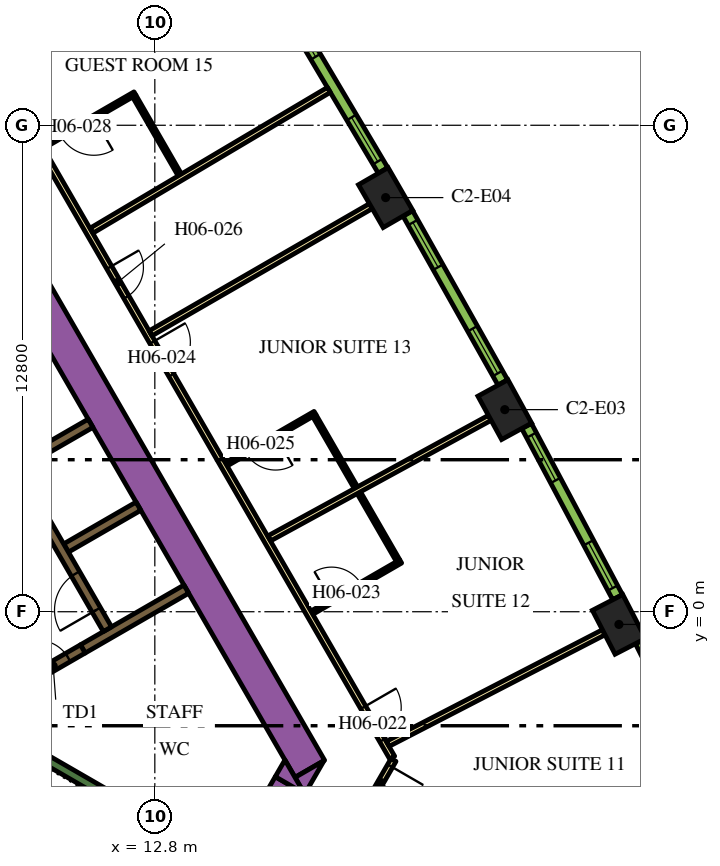
"""IFC4 building model, lengths in metres.
Left out: names, types, materials, properties, quantities, classifications, styles, units other than length and angle.
Written with IfcOpenShell. Run it as: python <this file> out.ifc"""

import sys

from ifc_helpers import new_model, si_unit, direction, frame, frame_2d, origin, origin_2d, place, context, subcontext, project, spatial, polyline, rectangle, outline, extrude, element, fill, save


model = new_model("IFC4")
c1 = context("Model", 3, precision=1e-05, world=origin(), true_north=direction((0.0, 1.0)))
c2 = subcontext(c1, "Body", "Model", "MODEL_VIEW")
j1 = project(units=[si_unit("LENGTHUNIT", "METRE"), si_unit("PLANEANGLEUNIT", "RADIAN")], contexts=[c1])
p1 = place(None, origin())
s1 = spatial("IfcSite", under=j1, at=p1, CompositionType="ELEMENT")
p2 = place(p1, origin())
s2 = spatial("IfcBuilding", under=s1, at=p2, CompositionType="ELEMENT")
p3 = place(p2, frame((0.0, 0.0, 83.7)))
s3 = spatial("IfcBuildingStorey", under=s2, at=p3, CompositionType="ELEMENT", Elevation=83.7)
for number, where, z_axis, x_axis in (
    (1, (25.012, -0.334, 0.0), (0.0, 0.0, 1.0), (-0.459, 0.888, 0.0)),
    (2, (22.009, 5.317, 0.0), (0.0, 0.0, 1.0), (-0.48, 0.877, 0.0)),
    (3, (18.874, 10.897, 0.0), (0.0, 0.0, 1.0), (-0.5, 0.866, 0.0)),
):
    element("IfcColumn", number, at=place(p3, frame(where, z_axis=z_axis, x_axis=x_axis)), inside=s3, PredefinedType="COLUMN", context=c2, shape_type="SweptSolid", body=[
        extrude(rectangle(XDim=1.3, YDim=0.9, at=origin_2d()), origin(), (0.0, 0.0, 1.0), 3.9),
    ])
p4 = place(p3, frame((6.776, 13.364, 0.0), z_axis=(0.0, 0.0, 1.0), x_axis=(0.500004177138, -0.8660229921, 0.0)))
e4 = element("IfcWall", 4, at=p4, inside=s3, PredefinedType="SOLIDWALL", context=c2, shape_type="SweptSolid", body=[
    extrude(rectangle(XDim=20.204, YDim=0.9, at=frame_2d((10.102, 0.0))), origin(), (0.0, 0.0, 1.0), 3.9),
])
p5 = place(p3, origin())
e5 = element("IfcWall", 5, at=p5, inside=s3, PredefinedType="SOLIDWALL", context=c2, shape_type="SweptSolid", body=[
    extrude(outline(polyline([(16.743, -4.8), (16.489, -4.36), (17.251, -3.92), (16.743, -4.8)])), origin(), (0.0, 0.0, 1.0), 3.9),
])
p6 = place(p3, frame((11.695, -12.644, 0.0), z_axis=(0.0, 0.0, 1.0), x_axis=(0.500010229568, 0.86601949766, 0.0)))
e6 = element("IfcWall", 6, at=p6, inside=s3, PredefinedType="SOLIDWALL", context=c2, shape_type="SweptSolid", body=[
    extrude(rectangle(XDim=9.326, YDim=0.9, at=frame_2d((4.663, 0.0))), origin(), (0.0, 0.0, 1.0), 3.9),
])
e7 = element("IfcWall", 7, at=p5, inside=s3, PredefinedType="SOLIDWALL", context=c2, shape_type="SweptSolid", body=[
    extrude(outline(polyline([(16.223, -3.9), (16.732, -4.78), (15.969, -4.34), (16.223, -3.9)])), origin(), (0.0, 0.0, 1.0), 3.9),
])
p7 = place(p3, frame((8.334, -2.964, 0.0), z_axis=(0.0, 0.0, 1.0), x_axis=(0.866016039709, -0.500016218704, 0.0)))
e8 = element("IfcWall", 8, at=p7, inside=s3, PredefinedType="SOLIDWALL", context=c2, shape_type="SweptSolid", body=[
    extrude(rectangle(XDim=7.05, YDim=0.25, at=frame_2d((3.525, 0.0))), origin(), (0.0, 0.0, 1.0), 3.9),
])
p8 = place(p3, frame((10.464, 1.677, 0.0), z_axis=(0.0, 0.0, 1.0), x_axis=(0.86605622881, 0.499946605688, 0.0)))
e9 = element("IfcWall", 9, at=p8, inside=s3, PredefinedType="SOLIDWALL", context=c2, shape_type="SweptSolid", body=[
    extrude(rectangle(XDim=2.2, YDim=0.25, at=frame_2d((1.1, 0.0))), origin(), (0.0, 0.0, 1.0), 3.9),
])
p9 = place(p3, frame((13.629, 0.594, 0.0), z_axis=(0.0, 0.0, 1.0), x_axis=(-0.86602790099, -0.499995674689, 0.0)))
e10 = element("IfcWall", 10, at=p9, inside=s3, PredefinedType="SOLIDWALL", context=c2, shape_type="SweptSolid", body=[
    extrude(rectangle(XDim=3.146, YDim=0.25, at=frame_2d((1.573, 0.0))), origin(), (0.0, 0.0, 1.0), 3.9),
])
p10 = place(p3, frame((9.204, 3.859, 0.0), z_axis=(0.0, 0.0, 1.0), x_axis=(0.86605622881, 0.499946605688, 0.0)))
e11 = element("IfcWall", 11, at=p10, inside=s3, PredefinedType="SOLIDWALL", context=c2, shape_type="SweptSolid", body=[
    extrude(rectangle(XDim=2.2, YDim=0.25, at=frame_2d((1.1, 0.0))), origin(), (0.0, 0.0, 1.0), 3.9),
])
p11 = place(p3, frame((11.553, -0.46, 0.0), z_axis=(0.0, 0.0, 1.0), x_axis=(-0.500006514828, 0.866021642414, 0.0)))
e12 = element("IfcWall", 12, at=p11, inside=s3, PredefinedType="SOLIDWALL", context=c2, shape_type="SweptSolid", body=[
    extrude(rectangle(XDim=12.35, YDim=0.25, at=frame_2d((6.175, 0.0))), origin(), (0.0, 0.0, 1.0), 3.9),
])
p12 = place(p11, frame((0.585, 0.0, 0.0)))
e13 = element("IfcOpeningElement", 13, at=p12, cuts=e12, PredefinedType="OPENING", context=c2, shape_type="SweptSolid", body=[
    extrude(rectangle(XDim=1.1, YDim=2.1, at=frame_2d((0.55, 1.05))), frame((0.0, 0.135, 0.0), z_axis=(0.0, -1.0, 0.0), x_axis=(1.0, 0.0, 0.0)), (0.0, 0.0, 1.0), 0.27),
])
p13 = place(p11, frame((3.105, 0.0, 0.0)))
e14 = element("IfcOpeningElement", 14, at=p13, cuts=e12, PredefinedType="OPENING", context=c2, shape_type="SweptSolid", body=[
    extrude(rectangle(XDim=1.1, YDim=2.1, at=frame_2d((0.55, 1.05))), frame((0.0, 0.135, 0.0), z_axis=(0.0, -1.0, 0.0), x_axis=(1.0, 0.0, 0.0)), (0.0, 0.0, 1.0), 0.27),
])
p14 = place(p11, frame((5.625, 0.0, 0.0)))
e15 = element("IfcOpeningElement", 15, at=p14, cuts=e12, PredefinedType="OPENING", context=c2, shape_type="SweptSolid", body=[
    extrude(rectangle(XDim=1.1, YDim=2.1, at=frame_2d((0.55, 1.05))), frame((0.0, 0.135, 0.0), z_axis=(0.0, -1.0, 0.0), x_axis=(1.0, 0.0, 0.0)), (0.0, 0.0, 1.0), 0.27),
])
p15 = place(p3, frame((9.346, -1.879, 0.0), z_axis=(0.0, 0.0, 1.0), x_axis=(0.866047807691, 0.499961193289, 0.0)))
e16 = element("IfcWall", 16, at=p15, inside=s3, PredefinedType="SOLIDWALL", context=c2, shape_type="SweptSolid", body=[
    extrude(rectangle(XDim=1.8, YDim=0.25, at=frame_2d((0.9, 0.0))), origin(), (0.0, 0.0, 1.0), 3.9),
])
p16 = place(p15, frame((0.45, 0.0, 0.0)))
e17 = element("IfcOpeningElement", 17, at=p16, cuts=e16, PredefinedType="OPENING", context=c2, shape_type="SweptSolid", body=[
    extrude(rectangle(XDim=0.9, YDim=2.1, at=frame_2d((0.45, 1.05))), frame((0.0, 0.135, 0.0), z_axis=(0.0, -1.0, 0.0), x_axis=(1.0, 0.0, 0.0)), (0.0, 0.0, 1.0), 0.27),
])
p17 = place(p3, frame((19.081, -3.9, 0.0), z_axis=(0.0, 0.0, 1.0), x_axis=(-0.499974327079, -0.866040225545, 0.0)))
e18 = element("IfcWall", 18, at=p17, inside=s3, PredefinedType="PARTITIONING", context=c2, shape_type="SweptSolid", body=[
    extrude(rectangle(XDim=5.258, YDim=0.15, at=frame_2d((2.629, 0.0))), origin(), (0.0, 0.0, 1.0), 2.75),
])
p18 = place(p17, frame((0.18, 0.0, 0.0)))
e19 = element("IfcOpeningElement", 19, at=p18, cuts=e18, PredefinedType="OPENING", context=c2, shape_type="SweptSolid", body=[
    extrude(rectangle(XDim=1.0, YDim=2.1, at=frame_2d((0.5, 1.05))), frame((0.0, 0.085, 0.0), z_axis=(0.0, -1.0, 0.0), x_axis=(1.0, 0.0, 0.0)), (0.0, 0.0, 1.0), 0.17),
])
p19 = place(p3, frame((6.163, 18.475, 0.0), z_axis=(0.0, 0.0, 1.0), x_axis=(0.500001317485, -0.866024643133, 0.0)))
e20 = element("IfcWall", 20, at=p19, inside=s3, PredefinedType="PARTITIONING", context=c2, shape_type="SweptSolid", body=[
    extrude(rectangle(XDim=25.767, YDim=0.15, at=frame_2d((12.883, 0.0))), origin(), (0.0, 0.0, 1.0), 2.75),
])
p20 = place(p19, frame((24.241, 0.0, 0.0)))
e21 = element("IfcOpeningElement", 21, at=p20, cuts=e20, PredefinedType="OPENING", context=c2, shape_type="SweptSolid", body=[
    extrude(rectangle(XDim=1.0, YDim=2.1, at=frame_2d((0.5, 1.05))), frame((0.0, 0.085, 0.0), z_axis=(0.0, -1.0, 0.0), x_axis=(1.0, 0.0, 0.0)), (0.0, 0.0, 1.0), 0.17),
])
p21 = place(p19, frame((13.144, 0.0, 0.0)))
e22 = element("IfcOpeningElement", 22, at=p21, cuts=e20, PredefinedType="OPENING", context=c2, shape_type="SweptSolid", body=[
    extrude(rectangle(XDim=1.0, YDim=2.1, at=frame_2d((0.5, 1.05))), frame((0.0, 0.085, 0.0), z_axis=(0.0, -1.0, 0.0), x_axis=(1.0, 0.0, 0.0)), (0.0, 0.0, 1.0), 0.17),
])
p22 = place(p19, frame((10.874, 0.0, 0.0)))
e23 = element("IfcOpeningElement", 23, at=p22, cuts=e20, PredefinedType="OPENING", context=c2, shape_type="SweptSolid", body=[
    extrude(rectangle(XDim=0.9, YDim=2.1, at=frame_2d((0.45, 1.05))), frame((0.0, 0.085, 0.0), z_axis=(0.0, -1.0, 0.0), x_axis=(1.0, 0.0, 0.0)), (0.0, 0.0, 1.0), 0.17),
])
p23 = place(p19, frame((3.718, 0.0, 0.0)))
e24 = element("IfcOpeningElement", 24, at=p23, cuts=e20, PredefinedType="OPENING", context=c2, shape_type="SweptSolid", body=[
    extrude(rectangle(XDim=1.1, YDim=2.1, at=frame_2d((0.55, 1.05))), frame((0.0, 0.085, 0.0), z_axis=(0.0, -1.0, 0.0), x_axis=(1.0, 0.0, 0.0)), (0.0, 0.0, 1.0), 0.17),
])
p24 = place(p19, frame((2.411, 0.0, 0.0)))
e25 = element("IfcOpeningElement", 25, at=p24, cuts=e20, PredefinedType="OPENING", context=c2, shape_type="SweptSolid", body=[
    extrude(rectangle(XDim=1.0, YDim=2.1, at=frame_2d((0.5, 1.05))), frame((0.0, 0.085, 0.0), z_axis=(0.0, -1.0, 0.0), x_axis=(1.0, 0.0, 0.0)), (0.0, 0.0, 1.0), 0.17),
])
p25 = place(p3, frame((17.379, 13.731, 0.0), z_axis=(0.0, 0.0, 1.0), x_axis=(-0.860132461691, -0.510070728768, 0.0)))
e26 = element("IfcWall", 26, at=p25, inside=s3, PredefinedType="PARTITIONING", context=c2, shape_type="SweptSolid", body=[
    extrude(rectangle(XDim=7.257, YDim=0.15, at=frame_2d((3.628, 0.0))), origin(), (0.0, 0.0, 1.0), 2.75),
])
p26 = place(p3, frame((18.484, 10.672, 0.0), z_axis=(0.0, 0.0, 1.0), x_axis=(-0.866019162053, -0.50001081084, 0.0)))
e27 = element("IfcWall", 27, at=p26, inside=s3, PredefinedType="PARTITIONING", context=c2, shape_type="SweptSolid", body=[
    extrude(rectangle(XDim=6.694, YDim=0.15, at=frame_2d((3.347, 0.0))), origin(), (0.0, 0.0, 1.0), 2.75),
])
p27 = place(p3, frame((21.614, 5.102, 0.0), z_axis=(0.0, 0.0, 1.0), x_axis=(-0.877484555087, -0.479604895287, 0.0)))
e28 = element("IfcWall", 28, at=p27, inside=s3, PredefinedType="PARTITIONING", context=c2, shape_type="SweptSolid", body=[
    extrude(rectangle(XDim=6.611, YDim=0.15, at=frame_2d((3.306, 0.0))), origin(), (0.0, 0.0, 1.0), 2.75),
])
p28 = place(p3, frame((24.613, -0.541, 0.0), z_axis=(0.0, 0.0, 1.0), x_axis=(-0.888459912519, -0.458954228487, 0.0)))
e29 = element("IfcWall", 29, at=p28, inside=s3, PredefinedType="PARTITIONING", context=c2, shape_type="SweptSolid", body=[
    extrude(rectangle(XDim=6.392, YDim=0.15, at=frame_2d((3.196, 0.0))), origin(), (0.0, 0.0, 1.0), 2.75),
])
p29 = place(p3, frame((16.931, -0.026, 0.0), z_axis=(0.0, 0.0, 1.0), x_axis=(0.866059108428, 0.4999416173, 0.0)))
e30 = element("IfcWall", 30, at=p29, inside=s3, PredefinedType="PARTITIONING", context=c2, shape_type="SweptSolid", body=[
    extrude(rectangle(XDim=2.7, YDim=0.1, at=frame_2d((1.35, 0.0))), origin(), (0.0, 0.0, 1.0), 2.75),
])
p30 = place(p29, frame((0.6, 0.0, 0.0)))
e31 = element("IfcOpeningElement", 31, at=p30, cuts=e30, PredefinedType="OPENING", context=c2, shape_type="SweptSolid", body=[
    extrude(rectangle(XDim=0.9, YDim=2.1, at=frame_2d((0.45, 1.05))), frame((0.0, 0.06, 0.0), z_axis=(0.0, -1.0, 0.0), x_axis=(1.0, 0.0, 0.0)), (0.0, 0.0, 1.0), 0.12),
])
p31 = place(p3, frame((19.196, 1.351, 0.0), z_axis=(0.0, 0.0, 1.0), x_axis=(-0.499956128963, 0.866050731258, 0.0)))
e32 = element("IfcWall", 32, at=p31, inside=s3, PredefinedType="PARTITIONING", context=c2, shape_type="SweptSolid", body=[
    extrude(rectangle(XDim=2.05, YDim=0.1, at=frame_2d((1.025, 0.0))), origin(), (0.0, 0.0, 1.0), 2.75),
])
p32 = place(p3, frame((17.016, 5.228, 0.0), z_axis=(0.0, 0.0, 1.0), x_axis=(-0.86599734893, -0.500048589285, 0.0)))
e33 = element("IfcWall", 33, at=p32, inside=s3, PredefinedType="PARTITIONING", context=c2, shape_type="SweptSolid", body=[
    extrude(rectangle(XDim=2.7, YDim=0.1, at=frame_2d((1.35, 0.0))), origin(), (0.0, 0.0, 1.0), 2.75),
])
p33 = place(p32, frame((1.2, 0.0, 0.0)))
e34 = element("IfcOpeningElement", 34, at=p33, cuts=e33, PredefinedType="OPENING", context=c2, shape_type="SweptSolid", body=[
    extrude(rectangle(XDim=0.9, YDim=2.1, at=frame_2d((0.45, 1.05))), frame((0.0, 0.06, 0.0), z_axis=(0.0, -1.0, 0.0), x_axis=(1.0, 0.0, 0.0)), (0.0, 0.0, 1.0), 0.12),
])
p34 = place(p3, frame((16.997, 5.16, 0.0), z_axis=(0.0, 0.0, 1.0), x_axis=(0.500011965869, -0.866018495177, 0.0)))
e35 = element("IfcWall", 35, at=p34, inside=s3, PredefinedType="PARTITIONING", context=c2, shape_type="SweptSolid", body=[
    extrude(rectangle(XDim=2.19, YDim=0.1, at=frame_2d((1.095, 0.0))), origin(), (0.0, 0.0, 1.0), 2.75),
])
p35 = place(p3, frame((12.277, 13.635, 0.0), z_axis=(0.0, 0.0, 1.0), x_axis=(-0.866034573852, -0.49998411664, 0.0)))
e36 = element("IfcWall", 36, at=p35, inside=s3, PredefinedType="PARTITIONING", context=c2, shape_type="SweptSolid", body=[
    extrude(rectangle(XDim=2.8, YDim=0.1, at=frame_2d((1.4, 0.0))), origin(), (0.0, 0.0, 1.0), 2.75),
])
p36 = place(p35, frame((1.25, 0.0, 0.0)))
e37 = element("IfcOpeningElement", 37, at=p36, cuts=e36, PredefinedType="OPENING", context=c2, shape_type="SweptSolid", body=[
    extrude(rectangle(XDim=1.0, YDim=2.1, at=frame_2d((0.5, 1.05))), frame((0.0, 0.06, 0.0), z_axis=(0.0, -1.0, 0.0), x_axis=(1.0, 0.0, 0.0)), (0.0, 0.0, 1.0), 0.12),
])
p37 = place(p3, frame((12.259, 13.567, 0.0), z_axis=(0.0, 0.0, 1.0), x_axis=(0.500017192868, -0.86601547725, 0.0)))
e38 = element("IfcWall", 38, at=p37, inside=s3, PredefinedType="PARTITIONING", context=c2, shape_type="SweptSolid", body=[
    extrude(rectangle(XDim=2.39, YDim=0.1, at=frame_2d((1.195, 0.0))), origin(), (0.0, 0.0, 1.0), 2.75),
])
p38 = place(p3, frame((27.864, -5.336, 0.0), z_axis=(0.0, 0.0, 1.0), x_axis=(-0.448534297211, 0.893765620409, 0.0)))
e39 = element("IfcWall", 39, at=p38, inside=s3, PredefinedType="SOLIDWALL", context=c2, shape_type="SweptSolid", body=[
    extrude(rectangle(XDim=5.1, YDim=0.29, at=frame_2d((2.55, 0.0))), origin(), (0.0, 0.0, 1.0), 3.65),
])
p39 = place(p38, frame((0.272, 0.0, 0.9)))
e40 = element("IfcOpeningElement", 40, at=p39, cuts=e39, PredefinedType="OPENING", context=c2, shape_type="SweptSolid", body=[
    extrude(rectangle(XDim=1.35, YDim=2.15, at=frame_2d((0.675, 1.075))), frame((0.0, 0.155, 0.0), z_axis=(0.0, -1.0, 0.0), x_axis=(1.0, 0.0, 0.0)), (0.0, 0.0, 1.0), 0.31),
])
p40 = place(p38, frame((3.478, 0.0, 0.9)))
e41 = element("IfcOpeningElement", 41, at=p40, cuts=e39, PredefinedType="OPENING", context=c2, shape_type="SweptSolid", body=[
    extrude(rectangle(XDim=1.35, YDim=2.15, at=frame_2d((0.675, 1.075))), frame((0.0, 0.155, 0.0), z_axis=(0.0, -1.0, 0.0), x_axis=(1.0, 0.0, 0.0)), (0.0, 0.0, 1.0), 0.31),
])
p41 = place(p3, frame((24.977, 0.383, 0.0), z_axis=(0.0, 0.0, 1.0), x_axis=(-0.469323203119, 0.883026461106, 0.0)))
e42 = element("IfcWall", 42, at=p41, inside=s3, PredefinedType="SOLIDWALL", context=c2, shape_type="SweptSolid", body=[
    extrude(rectangle(XDim=5.101, YDim=0.29, at=frame_2d((2.55, 0.0))), origin(), (0.0, 0.0, 1.0), 3.65),
])
p42 = place(p41, frame((0.273, 0.0, 0.9)))
e43 = element("IfcOpeningElement", 43, at=p42, cuts=e42, PredefinedType="OPENING", context=c2, shape_type="SweptSolid", body=[
    extrude(rectangle(XDim=1.35, YDim=2.15, at=frame_2d((0.675, 1.075))), frame((0.0, 0.155, 0.0), z_axis=(0.0, -1.0, 0.0), x_axis=(1.0, 0.0, 0.0)), (0.0, 0.0, 1.0), 0.31),
])
p43 = place(p41, frame((3.478, 0.0, 0.9)))
e44 = element("IfcOpeningElement", 44, at=p43, cuts=e42, PredefinedType="OPENING", context=c2, shape_type="SweptSolid", body=[
    extrude(rectangle(XDim=1.35, YDim=2.15, at=frame_2d((0.675, 1.075))), frame((0.0, 0.155, 0.0), z_axis=(0.0, -1.0, 0.0), x_axis=(1.0, 0.0, 0.0)), (0.0, 0.0, 1.0), 0.31),
])
p44 = place(p3, frame((21.956, 6.033, 0.0), z_axis=(0.0, 0.0, 1.0), x_axis=(-0.48983164787, 0.87181704316, 0.0)))
e45 = element("IfcWall", 45, at=p44, inside=s3, PredefinedType="SOLIDWALL", context=c2, shape_type="SweptSolid", body=[
    extrude(rectangle(XDim=5.1, YDim=0.29, at=frame_2d((2.55, 0.0))), origin(), (0.0, 0.0, 1.0), 3.65),
])
p45 = place(p44, frame((0.273, 0.0, 0.9)))
e46 = element("IfcOpeningElement", 46, at=p45, cuts=e45, PredefinedType="OPENING", context=c2, shape_type="SweptSolid", body=[
    extrude(rectangle(XDim=1.35, YDim=2.15, at=frame_2d((0.675, 1.075))), frame((0.0, 0.155, 0.0), z_axis=(0.0, -1.0, 0.0), x_axis=(1.0, 0.0, 0.0)), (0.0, 0.0, 1.0), 0.31),
])
p46 = place(p44, frame((3.478, 0.0, 0.9)))
e47 = element("IfcOpeningElement", 47, at=p46, cuts=e45, PredefinedType="OPENING", context=c2, shape_type="SweptSolid", body=[
    extrude(rectangle(XDim=1.35, YDim=2.15, at=frame_2d((0.675, 1.075))), frame((0.0, 0.155, 0.0), z_axis=(0.0, -1.0, 0.0), x_axis=(1.0, 0.0, 0.0)), (0.0, 0.0, 1.0), 0.31),
])
p47 = place(p3, frame((18.805, 11.611, 0.0), z_axis=(0.0, 0.0, 1.0), x_axis=(-0.510054281659, 0.860142214847, 0.0)))
e48 = element("IfcWall", 48, at=p47, inside=s3, PredefinedType="SOLIDWALL", context=c2, shape_type="SweptSolid", body=[
    extrude(rectangle(XDim=5.101, YDim=0.29, at=frame_2d((2.55, 0.0))), origin(), (0.0, 0.0, 1.0), 3.65),
])
p48 = place(p47, frame((0.273, 0.0, 0.9)))
e49 = element("IfcOpeningElement", 49, at=p48, cuts=e48, PredefinedType="OPENING", context=c2, shape_type="SweptSolid", body=[
    extrude(rectangle(XDim=1.35, YDim=2.15, at=frame_2d((0.675, 1.075))), frame((0.0, 0.155, 0.0), z_axis=(0.0, -1.0, 0.0), x_axis=(1.0, 0.0, 0.0)), (0.0, 0.0, 1.0), 0.31),
])
p49 = place(p47, frame((3.478, 0.0, 0.9)))
e50 = element("IfcOpeningElement", 50, at=p49, cuts=e48, PredefinedType="OPENING", context=c2, shape_type="SweptSolid", body=[
    extrude(rectangle(XDim=1.35, YDim=2.15, at=frame_2d((0.675, 1.075))), frame((0.0, 0.155, 0.0), z_axis=(0.0, -1.0, 0.0), x_axis=(1.0, 0.0, 0.0)), (0.0, 0.0, 1.0), 0.31),
])
p50 = place(p12, origin())
e51 = element("IfcDoor", 51, at=p50, inside=s3, OperationType="DOUBLE_DOOR_SLIDING", PredefinedType="DOOR", context=c2, shape_type="SweptSolid", body=[
    extrude(rectangle(XDim=1.1, YDim=2.1, at=frame_2d((0.55, 1.05))), frame((0.0, 0.025, 0.0), z_axis=(0.0, -1.0, 0.0), x_axis=(1.0, 0.0, 0.0)), (0.0, 0.0, 1.0), 0.05),
])
fill(e13, e51)
p51 = place(p16, origin())
e52 = element("IfcDoor", 52, at=p51, inside=s3, OperationType="SINGLE_SWING_LEFT", PredefinedType="DOOR", context=c2, shape_type="SweptSolid", body=[
    extrude(rectangle(XDim=0.9, YDim=2.1, at=frame_2d((0.45, 1.05))), frame((0.0, 0.025, 0.0), z_axis=(0.0, -1.0, 0.0), x_axis=(1.0, 0.0, 0.0)), (0.0, 0.0, 1.0), 0.05),
])
fill(e17, e52)
p52 = place(p18, origin())
e53 = element("IfcDoor", 53, at=p52, inside=s3, OperationType="SINGLE_SWING_LEFT", PredefinedType="DOOR", context=c2, shape_type="SweptSolid", body=[
    extrude(rectangle(XDim=1.0, YDim=2.1, at=frame_2d((0.5, 1.05))), frame((0.0, 0.025, 0.0), z_axis=(0.0, -1.0, 0.0), x_axis=(1.0, 0.0, 0.0)), (0.0, 0.0, 1.0), 0.05),
])
fill(e19, e53)
p53 = place(p20, origin())
e54 = element("IfcDoor", 54, at=p53, inside=s3, OperationType="SINGLE_SWING_RIGHT", PredefinedType="DOOR", context=c2, shape_type="SweptSolid", body=[
    extrude(rectangle(XDim=1.0, YDim=2.1, at=frame_2d((0.5, 1.05))), frame((0.0, 0.025, 0.0), z_axis=(0.0, -1.0, 0.0), x_axis=(1.0, 0.0, 0.0)), (0.0, 0.0, 1.0), 0.05),
])
fill(e21, e54)
p54 = place(p30, origin())
e55 = element("IfcDoor", 55, at=p54, inside=s3, OperationType="SINGLE_SWING_RIGHT", PredefinedType="DOOR", context=c2, shape_type="SweptSolid", body=[
    extrude(rectangle(XDim=0.9, YDim=2.1, at=frame_2d((0.45, 1.05))), frame((0.0, 0.025, 0.0), z_axis=(0.0, -1.0, 0.0), x_axis=(1.0, 0.0, 0.0)), (0.0, 0.0, 1.0), 0.05),
])
fill(e31, e55)
p55 = place(p21, origin())
e56 = element("IfcDoor", 56, at=p55, inside=s3, OperationType="SINGLE_SWING_LEFT", PredefinedType="DOOR", context=c2, shape_type="SweptSolid", body=[
    extrude(rectangle(XDim=1.0, YDim=2.1, at=frame_2d((0.5, 1.05))), frame((0.0, 0.025, 0.0), z_axis=(0.0, -1.0, 0.0), x_axis=(1.0, 0.0, 0.0)), (0.0, 0.0, 1.0), 0.05),
])
fill(e22, e56)
p56 = place(p33, origin())
e57 = element("IfcDoor", 57, at=p56, inside=s3, OperationType="SINGLE_SWING_LEFT", PredefinedType="DOOR", context=c2, shape_type="SweptSolid", body=[
    extrude(rectangle(XDim=0.9, YDim=2.1, at=frame_2d((0.45, 1.05))), frame((0.0, 0.025, 0.0), z_axis=(0.0, -1.0, 0.0), x_axis=(1.0, 0.0, 0.0)), (0.0, 0.0, 1.0), 0.05),
])
fill(e34, e57)
p57 = place(p22, origin())
e58 = element("IfcDoor", 58, at=p57, inside=s3, OperationType="SINGLE_SWING_RIGHT", PredefinedType="DOOR", context=c2, shape_type="SweptSolid", body=[
    extrude(rectangle(XDim=0.9, YDim=2.1, at=frame_2d((0.45, 1.05))), frame((0.0, 0.025, 0.0), z_axis=(0.0, -1.0, 0.0), x_axis=(1.0, 0.0, 0.0)), (0.0, 0.0, 1.0), 0.05),
])
fill(e23, e58)
p58 = place(p36, origin())
e59 = element("IfcDoor", 59, at=p58, inside=s3, OperationType="SINGLE_SWING_RIGHT", PredefinedType="DOOR", context=c2, shape_type="SweptSolid", body=[
    extrude(rectangle(XDim=1.0, YDim=2.1, at=frame_2d((0.5, 1.05))), frame((0.0, 0.025, 0.0), z_axis=(0.0, -1.0, 0.0), x_axis=(1.0, 0.0, 0.0)), (0.0, 0.0, 1.0), 0.05),
])
fill(e37, e59)
p59 = place(p42, origin())
e60 = element("IfcWindow", 60, at=p59, inside=s3, PartitioningType="DOUBLE_PANEL_VERTICAL", PredefinedType="WINDOW", context=c2, shape_type="SweptSolid", body=[
    extrude(rectangle(XDim=1.35, YDim=2.15, at=frame_2d((0.675, 1.075))), frame((0.0, 0.015, 0.0), z_axis=(0.0, -1.0, 0.0), x_axis=(1.0, 0.0, 0.0)), (0.0, 0.0, 1.0), 0.06),
])
fill(e43, e60)
p60 = place(p43, origin())
e61 = element("IfcWindow", 61, at=p60, inside=s3, PartitioningType="DOUBLE_PANEL_VERTICAL", PredefinedType="WINDOW", context=c2, shape_type="SweptSolid", body=[
    extrude(rectangle(XDim=1.35, YDim=2.15, at=frame_2d((0.675, 1.075))), frame((0.0, 0.015, 0.0), z_axis=(0.0, -1.0, 0.0), x_axis=(1.0, 0.0, 0.0)), (0.0, 0.0, 1.0), 0.06),
])
fill(e44, e61)
p61 = place(p45, origin())
e62 = element("IfcWindow", 62, at=p61, inside=s3, PartitioningType="DOUBLE_PANEL_VERTICAL", PredefinedType="WINDOW", context=c2, shape_type="SweptSolid", body=[
    extrude(rectangle(XDim=1.35, YDim=2.15, at=frame_2d((0.675, 1.075))), frame((0.0, 0.015, 0.0), z_axis=(0.0, -1.0, 0.0), x_axis=(1.0, 0.0, 0.0)), (0.0, 0.0, 1.0), 0.06),
])
fill(e46, e62)
p62 = place(p46, origin())
e63 = element("IfcWindow", 63, at=p62, inside=s3, PartitioningType="DOUBLE_PANEL_VERTICAL", PredefinedType="WINDOW", context=c2, shape_type="SweptSolid", body=[
    extrude(rectangle(XDim=1.35, YDim=2.15, at=frame_2d((0.675, 1.075))), frame((0.0, 0.015, 0.0), z_axis=(0.0, -1.0, 0.0), x_axis=(1.0, 0.0, 0.0)), (0.0, 0.0, 1.0), 0.06),
])
fill(e47, e63)
p63 = place(p48, origin())
e64 = element("IfcWindow", 64, at=p63, inside=s3, PartitioningType="DOUBLE_PANEL_VERTICAL", PredefinedType="WINDOW", context=c2, shape_type="SweptSolid", body=[
    extrude(rectangle(XDim=1.35, YDim=2.15, at=frame_2d((0.675, 1.075))), frame((0.0, 0.015, 0.0), z_axis=(0.0, -1.0, 0.0), x_axis=(1.0, 0.0, 0.0)), (0.0, 0.0, 1.0), 0.06),
])
fill(e49, e64)
p64 = place(p49, origin())
e65 = element("IfcWindow", 65, at=p64, inside=s3, PartitioningType="DOUBLE_PANEL_VERTICAL", PredefinedType="WINDOW", context=c2, shape_type="SweptSolid", body=[
    extrude(rectangle(XDim=1.35, YDim=2.15, at=frame_2d((0.675, 1.075))), frame((0.0, 0.015, 0.0), z_axis=(0.0, -1.0, 0.0), x_axis=(1.0, 0.0, 0.0)), (0.0, 0.0, 1.0), 0.06),
])
fill(e50, e65)
save(model, sys.argv[1])
